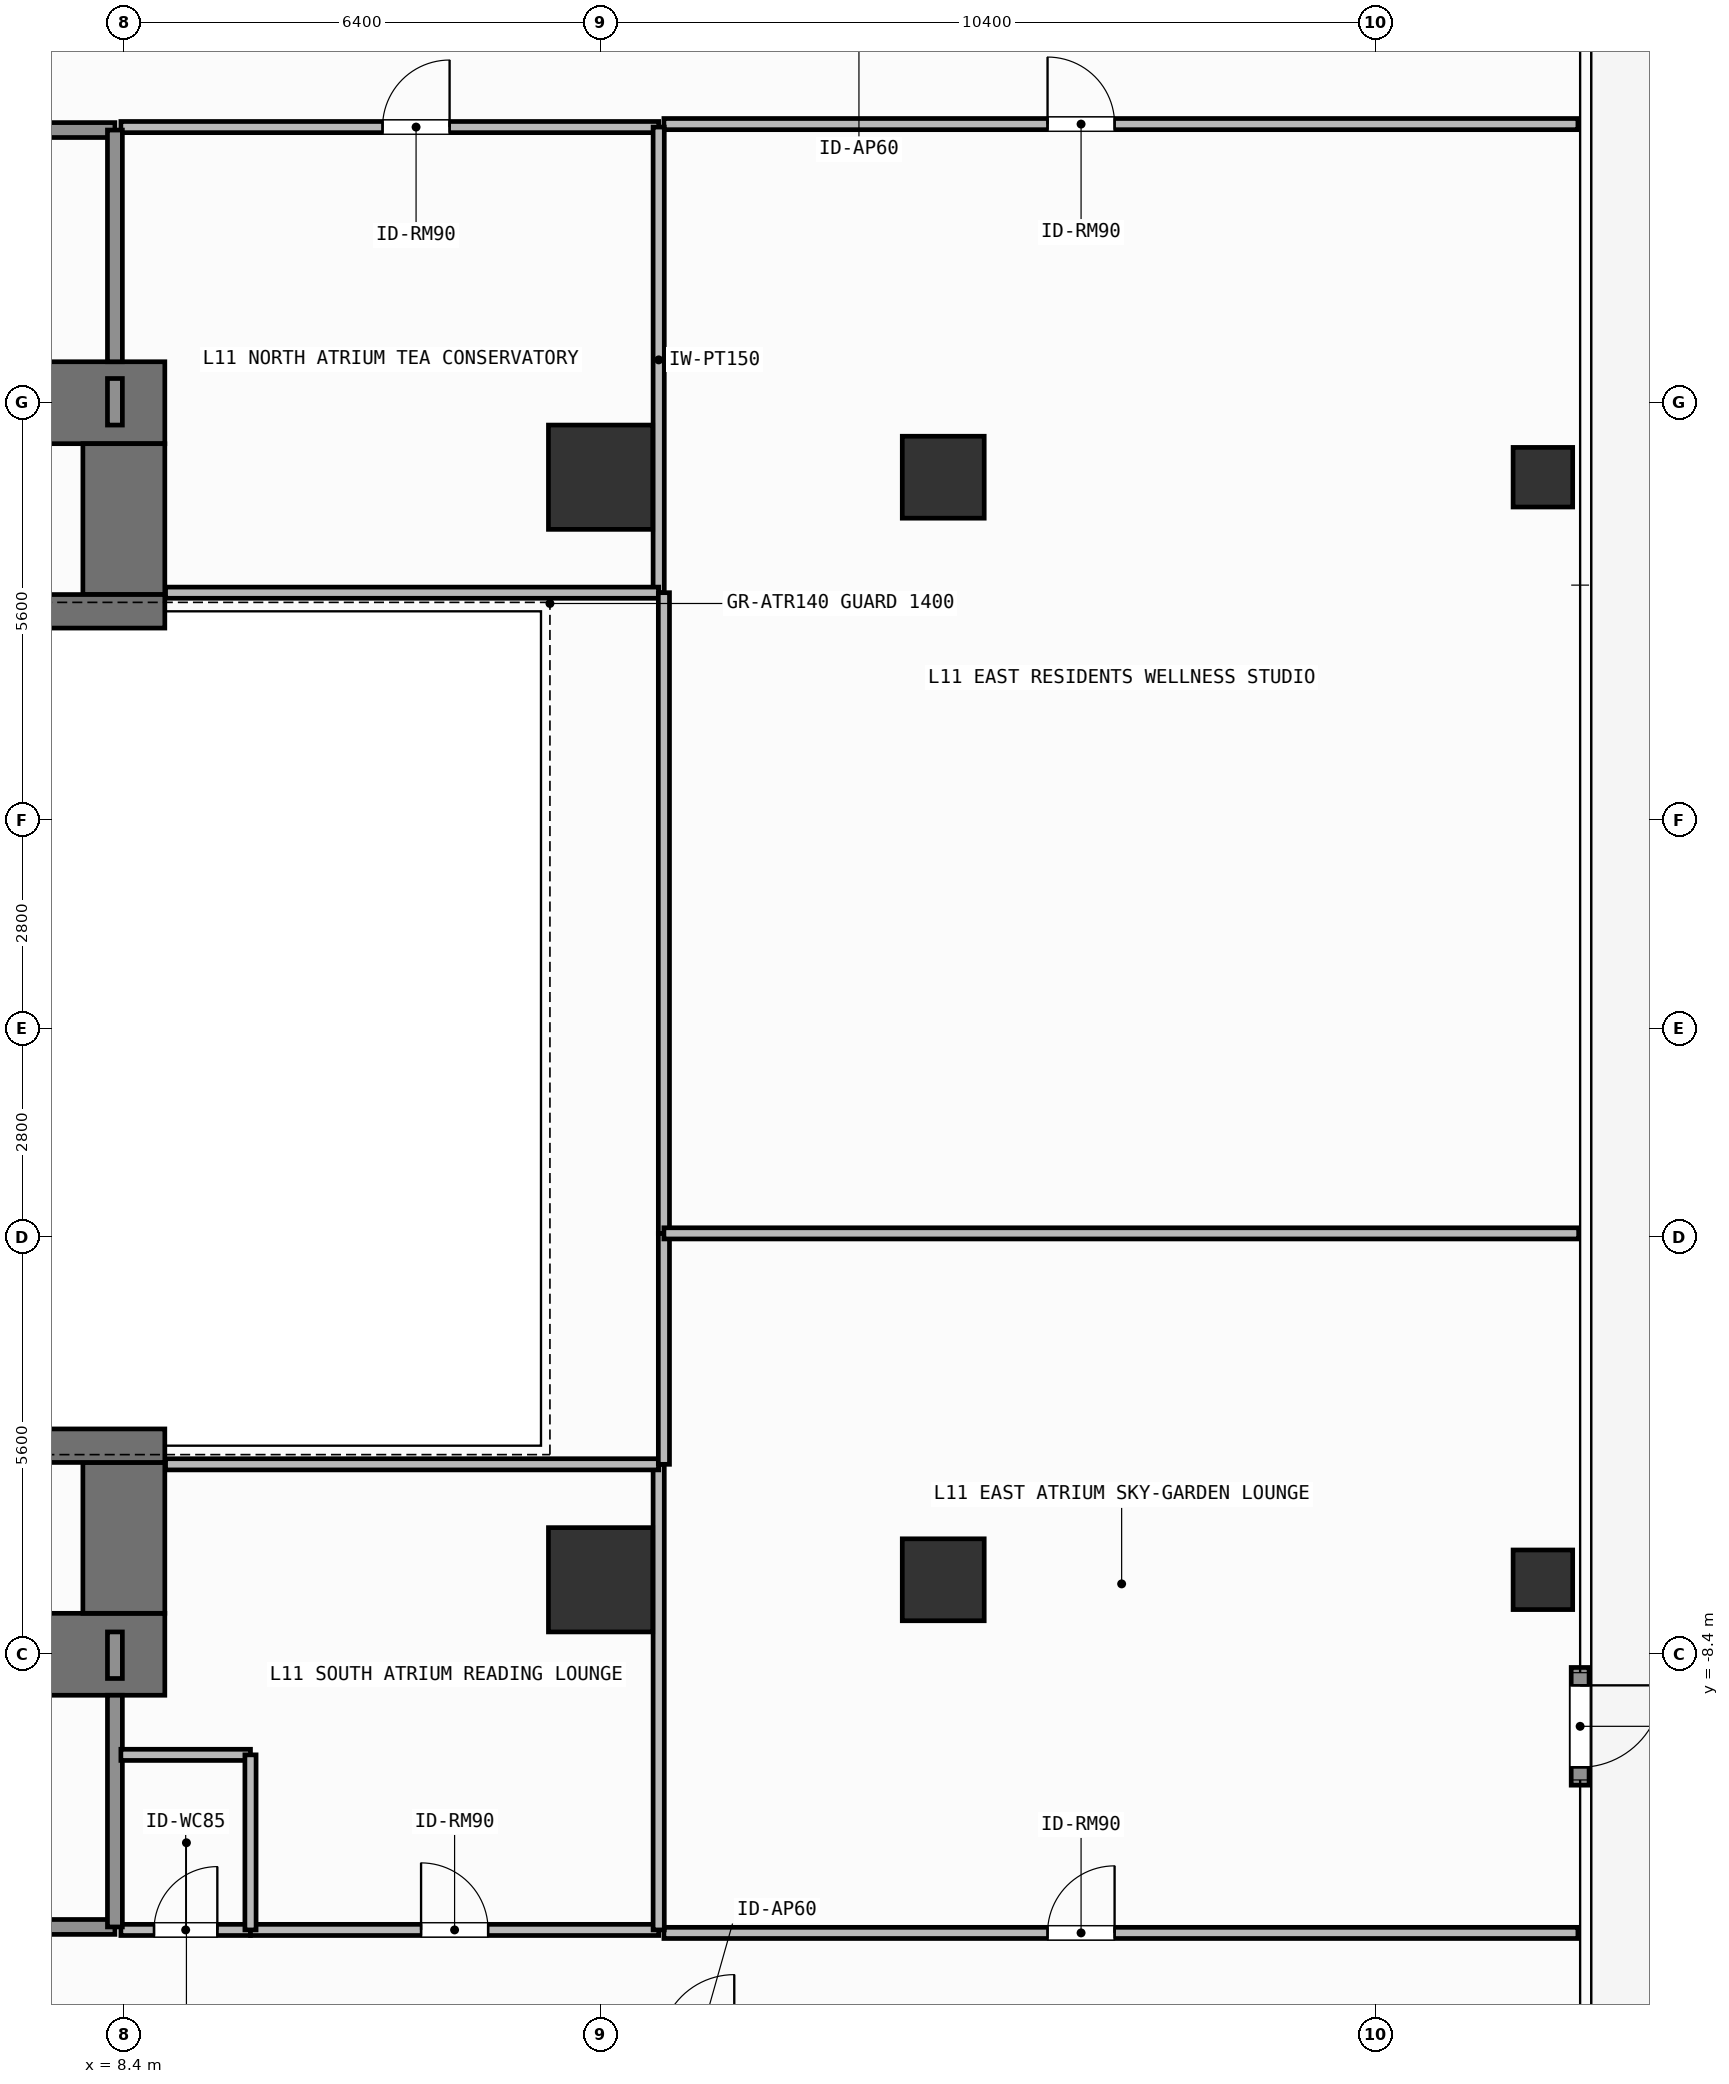
"""IFC4 building model, lengths in metres.
Left out: names, types, materials, properties, quantities, classifications, styles, units other than length and angle.
Written with IfcOpenShell. Run it as: python <this file> out.ifc"""

import sys

from ifc_helpers import new_model, si_unit, direction, frame, frame_2d, origin, origin_2d, place, context, subcontext, project, spatial, rectangle, hollow_rectangle, extrude, element, fill, save


model = new_model("IFC4")
c1 = context("Model", 3, precision=1e-05, world=origin(), true_north=direction((0.0, 1.0)))
c2 = subcontext(c1, "Body", "Model", "MODEL_VIEW")
j1 = project(units=[si_unit("LENGTHUNIT", "METRE"), si_unit("PLANEANGLEUNIT", "RADIAN")], contexts=[c1])
p1 = place(None, origin())
s1 = spatial("IfcSite", under=j1, at=p1, CompositionType="ELEMENT")
p2 = place(p1, origin())
s2 = spatial("IfcBuilding", under=s1, at=p2, CompositionType="ELEMENT")
p3 = place(p2, frame((0.0, 0.0, 42.3)))
s3 = spatial("IfcBuildingStorey", under=s2, at=p3, CompositionType="ELEMENT", Elevation=42.3)
p4 = place(p3, frame((6.12, -8.4, 0.0), z_axis=(0.0, 0.0, 1.0), x_axis=(1.0, 0.0, 0.0)))
e1 = element("IfcWall", 1, at=p4, inside=s3, PredefinedType="SHEAR", context=c2, shape_type="SweptSolid", body=[
    extrude(rectangle(XDim=2.83, YDim=1.1, at=frame_2d((1.415, 0.0))), origin(), (0.0, 0.0, 1.0), 3.9),
])
p5 = place(p3, frame((-7.55, 8.4, 0.0), z_axis=(0.0, 0.0, 1.0), x_axis=(1.0, 0.0, 0.0)))
e2 = element("IfcWall", 2, at=p5, inside=s3, PredefinedType="SHEAR", context=c2, shape_type="SweptSolid", body=[
    extrude(rectangle(XDim=16.5, YDim=1.1, at=frame_2d((8.25, 0.0))), origin(), (0.0, 0.0, 1.0), 3.9),
])
for number, where, z_axis, x_axis in (
    (3, (8.4, -7.85, 0.0), (0.0, 0.0, 1.0), (0.0, 1.0, 0.0)),
    (4, (8.4, 5.825, 0.0), (0.0, 0.0, 1.0), (0.0, 1.0, 0.0)),
):
    element("IfcWall", number, at=place(p3, frame(where, z_axis=z_axis, x_axis=x_axis)), inside=s3, PredefinedType="SHEAR", context=c2, shape_type="SweptSolid", body=[
        extrude(rectangle(XDim=2.025, YDim=1.1, at=frame_2d((1.013, 0.0))), origin(), (0.0, 0.0, 1.0), 3.9),
    ])
for number, where, z_axis, x_axis in (
    (5, (3.045, -5.6, 0.0), (0.0, 0.0, 1.0), (1.0, 0.0, 0.0)),
    (6, (3.045, 5.6, 0.0), (0.0, 0.0, 1.0), (1.0, 0.0, 0.0)),
):
    element("IfcWall", number, at=place(p3, frame(where, z_axis=z_axis, x_axis=x_axis)), inside=s3, PredefinedType="SHEAR", context=c2, shape_type="SweptSolid", body=[
        extrude(rectangle(XDim=5.905, YDim=0.45, at=frame_2d((2.953, 0.0))), origin(), (0.0, 0.0, 1.0), 3.9),
    ])
for number, where, z_axis, x_axis in (
    (7, (14.8, -7.4, 0.0), (0.0, 0.0, 1.0), (1.0, 0.0, 0.0)),
    (8, (14.8, 7.4, 0.0), (0.0, 0.0, 1.0), (1.0, 0.0, 0.0)),
):
    element("IfcColumn", number, at=place(p3, frame(where, z_axis=z_axis, x_axis=x_axis)), inside=s3, PredefinedType="COLUMN", context=c2, shape_type="SweptSolid", body=[
        extrude(rectangle(XDim=1.4, YDim=1.4, at=origin_2d()), origin(), (0.0, 0.0, 1.0), 3.9),
    ])
for number, where, z_axis, x_axis in (
    (9, (19.4, -7.4, 0.0), (0.0, 0.0, 1.0), (1.0, 0.0, 0.0)),
    (10, (19.4, 7.4, 0.0), (0.0, 0.0, 1.0), (1.0, 0.0, 0.0)),
):
    element("IfcColumn", number, at=place(p3, frame(where, z_axis=z_axis, x_axis=x_axis)), inside=s3, PredefinedType="COLUMN", context=c2, shape_type="SweptSolid", body=[
        extrude(rectangle(XDim=1.1, YDim=1.1, at=origin_2d()), origin(), (0.0, 0.0, 1.0), 3.9),
    ])
for number, where, z_axis, x_axis in (
    (11, (27.45, -7.4, 0.0), (0.0, 0.0, 1.0), (1.0, 0.0, 0.0)),
    (12, (27.45, 7.4, 0.0), (0.0, 0.0, 1.0), (1.0, 0.0, 0.0)),
):
    element("IfcColumn", number, at=place(p3, frame(where, z_axis=z_axis, x_axis=x_axis)), inside=s3, PredefinedType="COLUMN", context=c2, shape_type="SweptSolid", body=[
        extrude(hollow_rectangle(XDim=0.8, YDim=0.8, WallThickness=0.036, at=origin_2d()), origin(), (0.0, 0.0, 1.0), 3.9),
    ])
p6 = place(p3, frame((27.95, -8.577, 0.0), z_axis=(0.0, 0.0, 1.0), x_axis=(0.0, -1.0, 0.0)))
e13 = element("IfcWall", 13, at=p6, inside=s3, PredefinedType="SOLIDWALL", context=c2, shape_type="SweptSolid", body=[
    extrude(rectangle(XDim=1.58, YDim=0.24, at=frame_2d((0.79, 0.0))), origin(), (0.0, 0.0, 1.0), 3.68),
])
p7 = place(p6, frame((0.24, 0.0, 0.0)))
e14 = element("IfcOpeningElement", 14, at=p7, cuts=e13, PredefinedType="OPENING", context=c2, shape_type="SweptSolid", body=[
    extrude(rectangle(XDim=1.1, YDim=2.2, at=frame_2d((0.55, 1.1))), frame((0.0, 0.13, 0.0), z_axis=(0.0, -1.0, 0.0), x_axis=(1.0, 0.0, 0.0)), (0.0, 0.0, 1.0), 0.26),
])
p8 = place(p3, frame((4.58, -12.06, 0.0), z_axis=(0.0, 0.0, 1.0), x_axis=(1.0, 0.0, 0.0)))
e15 = element("IfcWall", 15, at=p8, inside=s3, PredefinedType="SOLIDWALL", context=c2, shape_type="SweptSolid", body=[
    extrude(rectangle(XDim=3.7, YDim=0.2, at=frame_2d((1.85, 0.0))), origin(), (0.0, 0.0, 1.0), 3.68),
])
p9 = place(p8, frame((1.212, 0.0, 0.0)))
e16 = element("IfcOpeningElement", 16, at=p9, cuts=e15, PredefinedType="OPENING", context=c2, shape_type="SweptSolid", body=[
    extrude(rectangle(XDim=1.1, YDim=2.15, at=frame_2d((0.55, 1.075))), frame((0.0, 0.11, 0.0), z_axis=(0.0, -1.0, 0.0), x_axis=(1.0, 0.0, 0.0)), (0.0, 0.0, 1.0), 0.22),
])
p10 = place(p3, frame((4.58, 12.06, 0.0), z_axis=(0.0, 0.0, 1.0), x_axis=(1.0, 0.0, 0.0)))
e17 = element("IfcWall", 17, at=p10, inside=s3, PredefinedType="SOLIDWALL", context=c2, shape_type="SweptSolid", body=[
    extrude(rectangle(XDim=3.7, YDim=0.2, at=frame_2d((1.85, 0.0))), origin(), (0.0, 0.0, 1.0), 3.68),
])
p11 = place(p10, frame((1.212, 0.0, 0.0)))
e18 = element("IfcOpeningElement", 18, at=p11, cuts=e17, PredefinedType="OPENING", context=c2, shape_type="SweptSolid", body=[
    extrude(rectangle(XDim=1.1, YDim=2.15, at=frame_2d((0.55, 1.075))), frame((0.0, 0.11, 0.0), z_axis=(0.0, -1.0, 0.0), x_axis=(1.0, 0.0, 0.0)), (0.0, 0.0, 1.0), 0.22),
])
p12 = place(p3, frame((8.36, -12.1, 0.0), z_axis=(0.0, 0.0, 1.0), x_axis=(1.0, 0.0, 0.0)))
e19 = element("IfcWall", 19, at=p12, inside=s3, PredefinedType="PARTITIONING", context=c2, shape_type="SweptSolid", body=[
    extrude(rectangle(XDim=1.74, YDim=0.15, at=frame_2d((0.87, 0.0))), origin(), (0.0, 0.0, 1.0), 3.68),
])
p13 = place(p12, frame((0.445, 0.0, 0.0)))
e20 = element("IfcOpeningElement", 20, at=p13, cuts=e19, PredefinedType="OPENING", context=c2, shape_type="SweptSolid", body=[
    extrude(rectangle(XDim=0.85, YDim=2.1, at=frame_2d((0.425, 1.05))), frame((0.0, 0.085, 0.0), z_axis=(0.0, -1.0, 0.0), x_axis=(1.0, 0.0, 0.0)), (0.0, 0.0, 1.0), 0.17),
])
p14 = place(p3, frame((10.1, -12.1, 0.0), z_axis=(0.0, 0.0, 1.0), x_axis=(1.0, 0.0, 0.0)))
e21 = element("IfcWall", 21, at=p14, inside=s3, PredefinedType="PARTITIONING", context=c2, shape_type="SweptSolid", body=[
    extrude(rectangle(XDim=5.48, YDim=0.15, at=frame_2d((2.74, 0.0))), origin(), (0.0, 0.0, 1.0), 3.68),
])
p15 = place(p14, frame((2.29, 0.0, 0.0)))
e22 = element("IfcOpeningElement", 22, at=p15, cuts=e21, PredefinedType="OPENING", context=c2, shape_type="SweptSolid", body=[
    extrude(rectangle(XDim=0.9, YDim=2.1, at=frame_2d((0.45, 1.05))), frame((0.0, 0.085, 0.0), z_axis=(0.0, -1.0, 0.0), x_axis=(1.0, 0.0, 0.0)), (0.0, 0.0, 1.0), 0.17),
])
p16 = place(p3, frame((8.36, 12.1, 0.0), z_axis=(0.0, 0.0, 1.0), x_axis=(1.0, 0.0, 0.0)))
e23 = element("IfcWall", 23, at=p16, inside=s3, PredefinedType="PARTITIONING", context=c2, shape_type="SweptSolid", body=[
    extrude(rectangle(XDim=7.22, YDim=0.15, at=frame_2d((3.61, 0.0))), origin(), (0.0, 0.0, 1.0), 3.68),
])
p17 = place(p16, frame((3.513, 0.0, 0.0)))
e24 = element("IfcOpeningElement", 24, at=p17, cuts=e23, PredefinedType="OPENING", context=c2, shape_type="SweptSolid", body=[
    extrude(rectangle(XDim=0.9, YDim=2.1, at=frame_2d((0.45, 1.05))), frame((0.0, 0.085, 0.0), z_axis=(0.0, -1.0, 0.0), x_axis=(1.0, 0.0, 0.0)), (0.0, 0.0, 1.0), 0.17),
])
p18 = place(p3, frame((15.65, -12.14, 0.0), z_axis=(0.0, 0.0, 1.0), x_axis=(1.0, 0.0, 0.0)))
e25 = element("IfcWall", 25, at=p18, inside=s3, PredefinedType="PARTITIONING", context=c2, shape_type="SweptSolid", body=[
    extrude(rectangle(XDim=12.27, YDim=0.15, at=frame_2d((6.135, 0.0))), origin(), (0.0, 0.0, 1.0), 3.68),
])
p19 = place(p18, frame((5.15, 0.0, 0.0)))
e26 = element("IfcOpeningElement", 26, at=p19, cuts=e25, PredefinedType="OPENING", context=c2, shape_type="SweptSolid", body=[
    extrude(rectangle(XDim=0.9, YDim=2.1, at=frame_2d((0.45, 1.05))), frame((0.0, 0.085, 0.0), z_axis=(0.0, -1.0, 0.0), x_axis=(1.0, 0.0, 0.0)), (0.0, 0.0, 1.0), 0.17),
])
p20 = place(p3, frame((15.65, 12.14, 0.0), z_axis=(0.0, 0.0, 1.0), x_axis=(1.0, 0.0, 0.0)))
e27 = element("IfcWall", 27, at=p20, inside=s3, PredefinedType="PARTITIONING", context=c2, shape_type="SweptSolid", body=[
    extrude(rectangle(XDim=12.27, YDim=0.15, at=frame_2d((6.135, 0.0))), origin(), (0.0, 0.0, 1.0), 3.68),
])
p21 = place(p20, frame((5.15, 0.0, 0.0)))
e28 = element("IfcOpeningElement", 28, at=p21, cuts=e27, PredefinedType="OPENING", context=c2, shape_type="SweptSolid", body=[
    extrude(rectangle(XDim=0.9, YDim=2.1, at=frame_2d((0.45, 1.05))), frame((0.0, 0.085, 0.0), z_axis=(0.0, -1.0, 0.0), x_axis=(1.0, 0.0, 0.0)), (0.0, 0.0, 1.0), 0.17),
])
for number, where, z_axis, x_axis in (
    (29, (8.28, -12.06, 0.0), (0.0, 0.0, 1.0), (0.0, 1.0, 0.0)),
    (30, (8.28, 8.95, 0.0), (0.0, 0.0, 1.0), (0.0, 1.0, 0.0)),
):
    element("IfcWall", number, at=place(p3, frame(where, z_axis=z_axis, x_axis=x_axis)), inside=s3, PredefinedType="SOLIDWALL", context=c2, shape_type="SweptSolid", body=[
        extrude(rectangle(XDim=3.11, YDim=0.2, at=frame_2d((1.555, 0.0))), origin(), (0.0, 0.0, 1.0), 3.68),
    ])
p22 = place(p3, frame((8.28, -8.725, 0.0), z_axis=(0.0, 0.0, 1.0), x_axis=(0.0, 1.0, 0.0)))
e31 = element("IfcWall", 31, at=p22, inside=s3, PredefinedType="SOLIDWALL", context=c2, shape_type="SweptSolid", body=[
    extrude(rectangle(XDim=0.625, YDim=0.2, at=frame_2d((0.312, 0.0))), origin(), (0.0, 0.0, 1.0), 3.68),
])
p23 = place(p3, frame((8.36, -9.75, 0.0), z_axis=(0.0, 0.0, 1.0), x_axis=(1.0, 0.0, 0.0)))
e32 = element("IfcWall", 32, at=p23, inside=s3, PredefinedType="PARTITIONING", context=c2, shape_type="SweptSolid", body=[
    extrude(rectangle(XDim=1.74, YDim=0.15, at=frame_2d((0.87, 0.0))), origin(), (0.0, 0.0, 1.0), 3.68),
])
p24 = place(p3, frame((10.1, -12.1, 0.0), z_axis=(0.0, 0.0, 1.0), x_axis=(0.0, 1.0, 0.0)))
e33 = element("IfcWall", 33, at=p24, inside=s3, PredefinedType="PARTITIONING", context=c2, shape_type="SweptSolid", body=[
    extrude(rectangle(XDim=2.35, YDim=0.15, at=frame_2d((1.175, 0.0))), origin(), (0.0, 0.0, 1.0), 3.68),
])
p25 = place(p3, frame((15.58, -12.1, 0.0), z_axis=(0.0, 0.0, 1.0), x_axis=(0.0, 1.0, 0.0)))
e34 = element("IfcWall", 34, at=p25, inside=s3, PredefinedType="PARTITIONING", context=c2, shape_type="SweptSolid", body=[
    extrude(rectangle(XDim=6.25, YDim=0.15, at=frame_2d((3.125, 0.0))), origin(), (0.0, 0.0, 1.0), 3.68),
])
p26 = place(p3, frame((8.96, -5.85, 0.0), z_axis=(0.0, 0.0, 1.0), x_axis=(1.0, 0.0, 0.0)))
e35 = element("IfcWall", 35, at=p26, inside=s3, PredefinedType="PARTITIONING", context=c2, shape_type="SweptSolid", body=[
    extrude(rectangle(XDim=6.62, YDim=0.15, at=frame_2d((3.31, 0.0))), origin(), (0.0, 0.0, 1.0), 3.68),
])
p27 = place(p3, frame((8.28, 8.1, 0.0), z_axis=(0.0, 0.0, 1.0), x_axis=(0.0, 1.0, 0.0)))
e36 = element("IfcWall", 36, at=p27, inside=s3, PredefinedType="SOLIDWALL", context=c2, shape_type="SweptSolid", body=[
    extrude(rectangle(XDim=0.625, YDim=0.2, at=frame_2d((0.312, 0.0))), origin(), (0.0, 0.0, 1.0), 3.68),
])
p28 = place(p3, frame((15.58, 5.85, 0.0), z_axis=(0.0, 0.0, 1.0), x_axis=(0.0, 1.0, 0.0)))
e37 = element("IfcWall", 37, at=p28, inside=s3, PredefinedType="PARTITIONING", context=c2, shape_type="SweptSolid", body=[
    extrude(rectangle(XDim=6.25, YDim=0.15, at=frame_2d((3.125, 0.0))), origin(), (0.0, 0.0, 1.0), 3.68),
])
p29 = place(p3, frame((8.96, 5.85, 0.0), z_axis=(0.0, 0.0, 1.0), x_axis=(1.0, 0.0, 0.0)))
e38 = element("IfcWall", 38, at=p29, inside=s3, PredefinedType="PARTITIONING", context=c2, shape_type="SweptSolid", body=[
    extrude(rectangle(XDim=6.62, YDim=0.15, at=frame_2d((3.31, 0.0))), origin(), (0.0, 0.0, 1.0), 3.68),
])
p30 = place(p3, frame((15.65, -5.85, 0.0), z_axis=(0.0, 0.0, 1.0), x_axis=(0.0, 1.0, 0.0)))
e39 = element("IfcWall", 39, at=p30, inside=s3, PredefinedType="PARTITIONING", context=c2, shape_type="SweptSolid", body=[
    extrude(rectangle(XDim=3.1, YDim=0.15, at=frame_2d((1.55, 0.0))), origin(), (0.0, 0.0, 1.0), 3.68),
])
p31 = place(p3, frame((15.65, -2.75, 0.0), z_axis=(0.0, 0.0, 1.0), x_axis=(0.0, 1.0, 0.0)))
e40 = element("IfcWall", 40, at=p31, inside=s3, PredefinedType="PARTITIONING", context=c2, shape_type="SweptSolid", body=[
    extrude(rectangle(XDim=8.6, YDim=0.15, at=frame_2d((4.3, 0.0))), origin(), (0.0, 0.0, 1.0), 3.68),
])
p32 = place(p3, frame((15.65, -2.75, 0.0), z_axis=(0.0, 0.0, 1.0), x_axis=(1.0, 0.0, 0.0)))
e41 = element("IfcWall", 41, at=p32, inside=s3, PredefinedType="PARTITIONING", context=c2, shape_type="SweptSolid", body=[
    extrude(rectangle(XDim=12.28, YDim=0.15, at=frame_2d((6.14, 0.0))), origin(), (0.0, 0.0, 1.0), 3.68),
])
p33 = place(p7, origin())
e42 = element("IfcDoor", 42, at=p33, inside=s3, OperationType="SINGLE_SWING_LEFT", PredefinedType="DOOR", context=c2, shape_type="SweptSolid", body=[
    extrude(rectangle(XDim=1.1, YDim=2.2, at=frame_2d((0.55, 1.1))), frame((0.0, 0.025, 0.0), z_axis=(0.0, -1.0, 0.0), x_axis=(1.0, 0.0, 0.0)), (0.0, 0.0, 1.0), 0.05),
])
fill(e14, e42)
p34 = place(p13, origin())
e43 = element("IfcDoor", 43, at=p34, inside=s3, OperationType="SINGLE_SWING_RIGHT", PredefinedType="DOOR", context=c2, shape_type="SweptSolid", body=[
    extrude(rectangle(XDim=0.85, YDim=2.1, at=frame_2d((0.425, 1.05))), frame((0.0, 0.025, 0.0), z_axis=(0.0, -1.0, 0.0), x_axis=(1.0, 0.0, 0.0)), (0.0, 0.0, 1.0), 0.05),
])
fill(e20, e43)
p35 = place(p15, origin())
e44 = element("IfcDoor", 44, at=p35, inside=s3, OperationType="SINGLE_SWING_LEFT", PredefinedType="DOOR", context=c2, shape_type="SweptSolid", body=[
    extrude(rectangle(XDim=0.9, YDim=2.1, at=frame_2d((0.45, 1.05))), frame((0.0, 0.025, 0.0), z_axis=(0.0, -1.0, 0.0), x_axis=(1.0, 0.0, 0.0)), (0.0, 0.0, 1.0), 0.05),
])
fill(e22, e44)
p36 = place(p17, origin())
e45 = element("IfcDoor", 45, at=p36, inside=s3, OperationType="SINGLE_SWING_RIGHT", PredefinedType="DOOR", context=c2, shape_type="SweptSolid", body=[
    extrude(rectangle(XDim=0.9, YDim=2.1, at=frame_2d((0.45, 1.05))), frame((0.0, 0.025, 0.0), z_axis=(0.0, -1.0, 0.0), x_axis=(1.0, 0.0, 0.0)), (0.0, 0.0, 1.0), 0.05),
])
fill(e24, e45)
p37 = place(p19, origin())
e46 = element("IfcDoor", 46, at=p37, inside=s3, OperationType="SINGLE_SWING_RIGHT", PredefinedType="DOOR", context=c2, shape_type="SweptSolid", body=[
    extrude(rectangle(XDim=0.9, YDim=2.1, at=frame_2d((0.45, 1.05))), frame((0.0, 0.025, 0.0), z_axis=(0.0, -1.0, 0.0), x_axis=(1.0, 0.0, 0.0)), (0.0, 0.0, 1.0), 0.05),
])
fill(e26, e46)
p38 = place(p21, origin())
e47 = element("IfcDoor", 47, at=p38, inside=s3, OperationType="SINGLE_SWING_LEFT", PredefinedType="DOOR", context=c2, shape_type="SweptSolid", body=[
    extrude(rectangle(XDim=0.9, YDim=2.1, at=frame_2d((0.45, 1.05))), frame((0.0, 0.025, 0.0), z_axis=(0.0, -1.0, 0.0), x_axis=(1.0, 0.0, 0.0)), (0.0, 0.0, 1.0), 0.05),
])
fill(e28, e47)
save(model, sys.argv[1])
